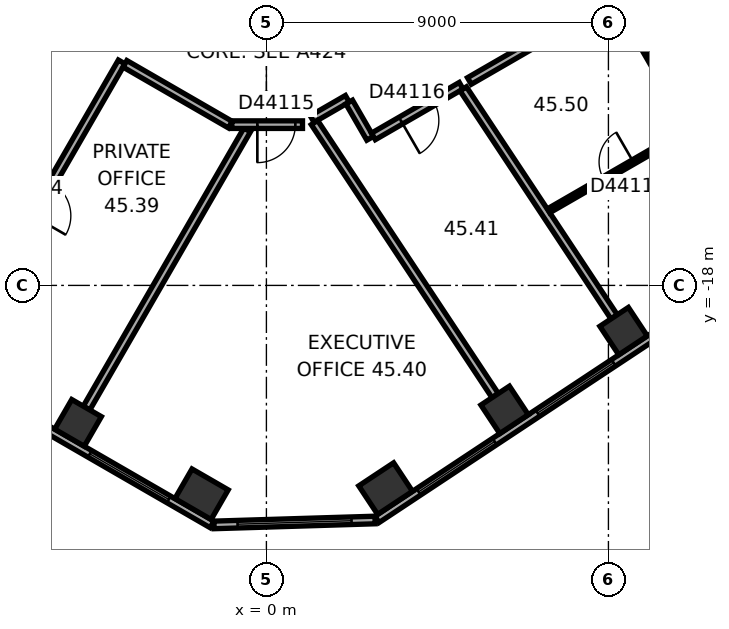
"""IFC4 building model, lengths in metres.
Left out: names, types, materials, properties, quantities, classifications, styles, units other than length and angle.
Written with IfcOpenShell. Run it as: python <this file> out.ifc"""

import sys

from ifc_helpers import new_model, si_unit, direction, frame, frame_2d, origin, origin_2d, place, context, subcontext, project, spatial, rectangle, extrude, element, fill, save


model = new_model("IFC4")
c1 = context("Model", 3, precision=1e-05, world=origin(), true_north=direction((0.0, 1.0)))
c2 = subcontext(c1, "Body", "Model", "MODEL_VIEW")
j1 = project(units=[si_unit("LENGTHUNIT", "METRE"), si_unit("PLANEANGLEUNIT", "RADIAN")], contexts=[c1])
p1 = place(None, origin())
s1 = spatial("IfcSite", under=j1, at=p1, CompositionType="ELEMENT")
p2 = place(p1, origin())
s2 = spatial("IfcBuilding", under=s1, at=p2, CompositionType="ELEMENT")
p3 = place(p2, frame((0.0, 0.0, 183.6)))
s3 = spatial("IfcBuildingStorey", under=s2, at=p3, CompositionType="ELEMENT", Elevation=183.6)
p4 = place(p3, frame((-4.958, -21.617, 0.0), z_axis=(0.0, 0.0, 1.0), x_axis=(0.866025403784, -0.5, 0.0)))
e1 = element("IfcColumn", 1, at=p4, inside=s3, PredefinedType="COLUMN", context=c2, shape_type="SweptSolid", body=[
    extrude(rectangle(XDim=0.9, YDim=0.9, at=origin_2d()), origin(), (0.0, 0.0, 1.0), 3.7),
])
for number, where, z_axis, x_axis in (
    (2, (-1.706, -23.494, 0.0), (0.0, 0.0, 1.0), (0.866, -0.5, 0.0)),
    (3, (3.137, -23.346, 0.0), (0.0, 0.0, 1.0), (0.834, 0.552, 0.0)),
):
    element("IfcColumn", number, at=place(p3, frame(where, z_axis=z_axis, x_axis=x_axis)), inside=s3, PredefinedType="COLUMN", context=c2, shape_type="SweptSolid", body=[
        extrude(rectangle(XDim=1.1, YDim=0.9, at=origin_2d()), origin(), (0.0, 0.0, 1.0), 3.7),
    ])
for number, where, z_axis, x_axis in (
    (4, (6.268, -21.274, 0.0), (0.0, 0.0, 1.0), (0.834, 0.552, 0.0)),
    (5, (9.398, -19.202, 0.0), (0.0, 0.0, 1.0), (0.834, 0.552, 0.0)),
):
    element("IfcColumn", number, at=place(p3, frame(where, z_axis=z_axis, x_axis=x_axis)), inside=s3, PredefinedType="COLUMN", context=c2, shape_type="SweptSolid", body=[
        extrude(rectangle(XDim=0.9, YDim=0.9, at=origin_2d()), origin(), (0.0, 0.0, 1.0), 3.7),
    ])
p5 = place(p3, frame((-10.25, -5.629, 0.0), z_axis=(0.0, 0.0, 1.0), x_axis=(0.866022616891, -0.50000482701, 0.0)))
e6 = element("IfcWall", 6, at=p5, inside=s3, PredefinedType="SHEAR", context=c2, shape_type="SweptSolid", body=[
    extrude(rectangle(XDim=12.125, YDim=1.0, at=frame_2d((6.062, 0.0))), origin(), (0.0, 0.0, 1.0), 3.7),
])
p6 = place(p5, frame((6.262, 0.0, 0.0)))
e7 = element("IfcOpeningElement", 7, at=p6, cuts=e6, PredefinedType="OPENING", context=c2, shape_type="SweptSolid", body=[
    extrude(rectangle(XDim=1.5, YDim=2.1, at=frame_2d((0.75, 1.05))), frame((0.0, 0.51, 0.0), z_axis=(0.0, -1.0, 0.0), x_axis=(1.0, 0.0, 0.0)), (0.0, 0.0, 1.0), 1.02),
])
p7 = place(p5, frame((1.712, 0.0, 0.0)))
e8 = element("IfcOpeningElement", 8, at=p7, cuts=e6, PredefinedType="OPENING", context=c2, shape_type="SweptSolid", body=[
    extrude(rectangle(XDim=1.1, YDim=2.1, at=frame_2d((0.55, 1.05))), frame((0.0, 0.51, 0.0), z_axis=(0.0, -1.0, 0.0), x_axis=(1.0, 0.0, 0.0)), (0.0, 0.0, 1.0), 1.02),
])
p8 = place(p5, frame((4.312, 0.0, 0.0)))
e9 = element("IfcOpeningElement", 9, at=p8, cuts=e6, PredefinedType="OPENING", context=c2, shape_type="SweptSolid", body=[
    extrude(rectangle(XDim=1.1, YDim=2.1, at=frame_2d((0.55, 1.05))), frame((0.0, 0.51, 0.0), z_axis=(0.0, -1.0, 0.0), x_axis=(1.0, 0.0, 0.0)), (0.0, 0.0, 1.0), 1.02),
])
p9 = place(p3, frame((-0.25, -11.691, 0.0), z_axis=(0.0, 0.0, 1.0), x_axis=(0.866022616891, 0.50000482701, 0.0)))
e10 = element("IfcWall", 10, at=p9, inside=s3, PredefinedType="SHEAR", context=c2, shape_type="SweptSolid", body=[
    extrude(rectangle(XDim=12.125, YDim=1.0, at=frame_2d((6.062, 0.0))), origin(), (0.0, 0.0, 1.0), 3.7),
])
p10 = place(p9, frame((2.612, 0.0, 0.0)))
e11 = element("IfcOpeningElement", 11, at=p10, cuts=e10, PredefinedType="OPENING", context=c2, shape_type="SweptSolid", body=[
    extrude(rectangle(XDim=1.1, YDim=2.1, at=frame_2d((0.55, 1.05))), frame((0.0, 0.51, 0.0), z_axis=(0.0, -1.0, 0.0), x_axis=(1.0, 0.0, 0.0)), (0.0, 0.0, 1.0), 1.02),
])
p11 = place(p9, frame((5.212, 0.0, 0.0)))
e12 = element("IfcOpeningElement", 12, at=p11, cuts=e10, PredefinedType="OPENING", context=c2, shape_type="SweptSolid", body=[
    extrude(rectangle(XDim=1.1, YDim=2.1, at=frame_2d((0.55, 1.05))), frame((0.0, 0.51, 0.0), z_axis=(0.0, -1.0, 0.0), x_axis=(1.0, 0.0, 0.0)), (0.0, 0.0, 1.0), 1.02),
])
p12 = place(p9, frame((7.812, 0.0, 0.0)))
e13 = element("IfcOpeningElement", 13, at=p12, cuts=e10, PredefinedType="OPENING", context=c2, shape_type="SweptSolid", body=[
    extrude(rectangle(XDim=1.1, YDim=2.1, at=frame_2d((0.55, 1.05))), frame((0.0, 0.51, 0.0), z_axis=(0.0, -1.0, 0.0), x_axis=(1.0, 0.0, 0.0)), (0.0, 0.0, 1.0), 1.02),
])
p13 = place(p3, frame((-18.789, -14.267, 0.0), z_axis=(0.0, 0.0, 1.0), x_axis=(0.866023315909, -0.500003616288, 0.0)))
e14 = element("IfcWall", 14, at=p13, inside=s3, PredefinedType="STANDARD", context=c2, shape_type="SweptSolid", body=[
    extrude(rectangle(XDim=20.044, YDim=0.2, at=frame_2d((10.022, 0.0))), origin(), (0.0, 0.0, 1.0), 3.7),
])
p14 = place(p13, frame((1.314, 0.0, 0.9)))
e15 = element("IfcOpeningElement", 15, at=p14, cuts=e14, PredefinedType="OPENING", context=c2, shape_type="SweptSolid", body=[
    extrude(rectangle(XDim=2.4, YDim=2.0, at=frame_2d((1.2, 1.0))), frame((0.0, 0.11, 0.0), z_axis=(0.0, -1.0, 0.0), x_axis=(1.0, 0.0, 0.0)), (0.0, 0.0, 1.0), 0.22),
])
p15 = place(p13, frame((5.069, 0.0, 0.9)))
e16 = element("IfcOpeningElement", 16, at=p15, cuts=e14, PredefinedType="OPENING", context=c2, shape_type="SweptSolid", body=[
    extrude(rectangle(XDim=2.4, YDim=2.0, at=frame_2d((1.2, 1.0))), frame((0.0, 0.11, 0.0), z_axis=(0.0, -1.0, 0.0), x_axis=(1.0, 0.0, 0.0)), (0.0, 0.0, 1.0), 0.22),
])
p16 = place(p13, frame((8.823, 0.0, 0.9)))
e17 = element("IfcOpeningElement", 17, at=p16, cuts=e14, PredefinedType="OPENING", context=c2, shape_type="SweptSolid", body=[
    extrude(rectangle(XDim=2.4, YDim=2.0, at=frame_2d((1.2, 1.0))), frame((0.0, 0.11, 0.0), z_axis=(0.0, -1.0, 0.0), x_axis=(1.0, 0.0, 0.0)), (0.0, 0.0, 1.0), 0.22),
])
p17 = place(p13, frame((12.577, 0.0, 0.9)))
e18 = element("IfcOpeningElement", 18, at=p17, cuts=e14, PredefinedType="OPENING", context=c2, shape_type="SweptSolid", body=[
    extrude(rectangle(XDim=2.4, YDim=2.0, at=frame_2d((1.2, 1.0))), frame((0.0, 0.11, 0.0), z_axis=(0.0, -1.0, 0.0), x_axis=(1.0, 0.0, 0.0)), (0.0, 0.0, 1.0), 0.22),
])
p18 = place(p13, frame((16.331, 0.0, 0.9)))
e19 = element("IfcOpeningElement", 19, at=p18, cuts=e14, PredefinedType="OPENING", context=c2, shape_type="SweptSolid", body=[
    extrude(rectangle(XDim=2.4, YDim=2.0, at=frame_2d((1.2, 1.0))), frame((0.0, 0.11, 0.0), z_axis=(0.0, -1.0, 0.0), x_axis=(1.0, 0.0, 0.0)), (0.0, 0.0, 1.0), 0.22),
])
p19 = place(p3, frame((-1.378, -24.302, 0.0), z_axis=(0.0, 0.0, 1.0), x_axis=(0.999533857267, 0.030529791629, 0.0)))
e20 = element("IfcWall", 20, at=p19, inside=s3, PredefinedType="STANDARD", context=c2, shape_type="SweptSolid", body=[
    extrude(rectangle(XDim=4.238, YDim=0.2, at=frame_2d((2.119, 0.0))), origin(), (0.0, 0.0, 1.0), 3.7),
])
p20 = place(p19, frame((0.619, 0.0, 0.9)))
e21 = element("IfcOpeningElement", 21, at=p20, cuts=e20, PredefinedType="OPENING", context=c2, shape_type="SweptSolid", body=[
    extrude(rectangle(XDim=3.0, YDim=2.0, at=frame_2d((1.5, 1.0))), frame((0.0, 0.11, 0.0), z_axis=(0.0, -1.0, 0.0), x_axis=(1.0, 0.0, 0.0)), (0.0, 0.0, 1.0), 0.22),
])
p21 = place(p3, frame((2.911, -24.156, 0.0), z_axis=(0.0, 0.0, 1.0), x_axis=(0.833882163564, 0.551942512668, 0.0)))
e22 = element("IfcWall", 22, at=p21, inside=s3, PredefinedType="STANDARD", context=c2, shape_type="SweptSolid", body=[
    extrude(rectangle(XDim=20.044, YDim=0.2, at=frame_2d((10.022, 0.0))), origin(), (0.0, 0.0, 1.0), 3.7),
])
p22 = place(p21, frame((1.313, 0.0, 0.9)))
e23 = element("IfcOpeningElement", 23, at=p22, cuts=e22, PredefinedType="OPENING", context=c2, shape_type="SweptSolid", body=[
    extrude(rectangle(XDim=2.4, YDim=2.0, at=frame_2d((1.2, 1.0))), frame((0.0, 0.11, 0.0), z_axis=(0.0, -1.0, 0.0), x_axis=(1.0, 0.0, 0.0)), (0.0, 0.0, 1.0), 0.22),
])
p23 = place(p21, frame((5.067, 0.0, 0.9)))
e24 = element("IfcOpeningElement", 24, at=p23, cuts=e22, PredefinedType="OPENING", context=c2, shape_type="SweptSolid", body=[
    extrude(rectangle(XDim=2.4, YDim=2.0, at=frame_2d((1.2, 1.0))), frame((0.0, 0.11, 0.0), z_axis=(0.0, -1.0, 0.0), x_axis=(1.0, 0.0, 0.0)), (0.0, 0.0, 1.0), 0.22),
])
p24 = place(p21, frame((8.821, 0.0, 0.9)))
e25 = element("IfcOpeningElement", 25, at=p24, cuts=e22, PredefinedType="OPENING", context=c2, shape_type="SweptSolid", body=[
    extrude(rectangle(XDim=2.4, YDim=2.0, at=frame_2d((1.2, 1.0))), frame((0.0, 0.11, 0.0), z_axis=(0.0, -1.0, 0.0), x_axis=(1.0, 0.0, 0.0)), (0.0, 0.0, 1.0), 0.22),
])
p25 = place(p21, frame((12.575, 0.0, 0.9)))
e26 = element("IfcOpeningElement", 26, at=p25, cuts=e22, PredefinedType="OPENING", context=c2, shape_type="SweptSolid", body=[
    extrude(rectangle(XDim=2.4, YDim=2.0, at=frame_2d((1.2, 1.0))), frame((0.0, 0.11, 0.0), z_axis=(0.0, -1.0, 0.0), x_axis=(1.0, 0.0, 0.0)), (0.0, 0.0, 1.0), 0.22),
])
p26 = place(p21, frame((16.329, 0.0, 0.9)))
e27 = element("IfcOpeningElement", 27, at=p26, cuts=e22, PredefinedType="OPENING", context=c2, shape_type="SweptSolid", body=[
    extrude(rectangle(XDim=2.4, YDim=2.0, at=frame_2d((1.2, 1.0))), frame((0.0, 0.11, 0.0), z_axis=(0.0, -1.0, 0.0), x_axis=(1.0, 0.0, 0.0)), (0.0, 0.0, 1.0), 0.22),
])
p27 = place(p3, frame((-7.984, -19.351, 0.0), z_axis=(0.0, 0.0, 1.0), x_axis=(0.500010139422, 0.866019549707, 0.0)))
e28 = element("IfcWall", 28, at=p27, inside=s3, PredefinedType="PARTITIONING", context=c2, shape_type="SweptSolid", body=[
    extrude(rectangle(XDim=8.35, YDim=0.2, at=frame_2d((4.175, 0.0))), origin(), (0.0, 0.0, 1.0), 3.42),
])
p28 = place(p27, frame((3.675, 0.0, 0.0)))
e29 = element("IfcOpeningElement", 29, at=p28, cuts=e28, PredefinedType="OPENING", context=c2, shape_type="SweptSolid", body=[
    extrude(rectangle(XDim=1.0, YDim=2.1, at=frame_2d((0.5, 1.05))), frame((0.0, 0.11, 0.0), z_axis=(0.0, -1.0, 0.0), x_axis=(1.0, 0.0, 0.0)), (0.0, 0.0, 1.0), 0.22),
])
p29 = place(p3, frame((-4.732, -21.228, 0.0), z_axis=(0.0, 0.0, 1.0), x_axis=(0.500000843414, 0.866024916838, 0.0)))
e30 = element("IfcWall", 30, at=p29, inside=s3, PredefinedType="PARTITIONING", context=c2, shape_type="SweptSolid", body=[
    extrude(rectangle(XDim=8.452, YDim=0.2, at=frame_2d((4.226, 0.0))), origin(), (0.0, 0.0, 1.0), 3.42),
])
p30 = place(p3, frame((-3.722, -12.169, 0.0), z_axis=(0.0, 0.0, 1.0), x_axis=(0.866033163891, -0.499986558861, 0.0)))
e31 = element("IfcWall", 31, at=p30, inside=s3, PredefinedType="PARTITIONING", context=c2, shape_type="SweptSolid", body=[
    extrude(rectangle(XDim=3.201, YDim=0.2, at=frame_2d((1.6, 0.0))), origin(), (0.0, 0.0, 1.0), 3.42),
])
p31 = place(p3, frame((-0.91, -13.77, 0.0), z_axis=(0.0, 0.0, 1.0), x_axis=(1.0, 0.0, 0.0)))
e32 = element("IfcWall", 32, at=p31, inside=s3, PredefinedType="PARTITIONING", context=c2, shape_type="SweptSolid", body=[
    extrude(rectangle(XDim=1.86, YDim=0.2, at=frame_2d((0.93, 0.0))), origin(), (0.0, 0.0, 1.0), 3.42),
])
p32 = place(p31, frame((0.672, 0.0, 0.0)))
e33 = element("IfcOpeningElement", 33, at=p32, cuts=e32, PredefinedType="OPENING", context=c2, shape_type="SweptSolid", body=[
    extrude(rectangle(XDim=1.0, YDim=2.1, at=frame_2d((0.5, 1.05))), frame((0.0, 0.11, 0.0), z_axis=(0.0, -1.0, 0.0), x_axis=(1.0, 0.0, 0.0)), (0.0, 0.0, 1.0), 0.22),
])
p33 = place(p3, frame((1.204, -13.623, 0.0), z_axis=(0.0, 0.0, 1.0), x_axis=(0.866040989419, 0.499973003918, 0.0)))
e34 = element("IfcWall", 34, at=p33, inside=s3, PredefinedType="PARTITIONING", context=c2, shape_type="SweptSolid", body=[
    extrude(rectangle(XDim=1.068, YDim=0.2, at=frame_2d((0.534, 0.0))), origin(), (0.0, 0.0, 1.0), 3.42),
])
p34 = place(p3, frame((2.179, -13.176, 0.0), z_axis=(0.0, 0.0, 1.0), x_axis=(0.499978356969, -0.866037899034, 0.0)))
e35 = element("IfcWall", 35, at=p34, inside=s3, PredefinedType="PARTITIONING", context=c2, shape_type="SweptSolid", body=[
    extrude(rectangle(XDim=1.101, YDim=0.2, at=frame_2d((0.551, 0.0))), origin(), (0.0, 0.0, 1.0), 3.42),
])
p35 = place(p3, frame((2.816, -14.079, 0.0), z_axis=(0.0, 0.0, 1.0), x_axis=(0.866008705299, 0.50002892151, 0.0)))
e36 = element("IfcWall", 36, at=p35, inside=s3, PredefinedType="PARTITIONING", context=c2, shape_type="SweptSolid", body=[
    extrude(rectangle(XDim=2.666, YDim=0.2, at=frame_2d((1.333, 0.0))), origin(), (0.0, 0.0, 1.0), 3.42),
])
p36 = place(p35, frame((0.833, 0.0, 0.0)))
e37 = element("IfcOpeningElement", 37, at=p36, cuts=e36, PredefinedType="OPENING", context=c2, shape_type="SweptSolid", body=[
    extrude(rectangle(XDim=1.0, YDim=2.1, at=frame_2d((0.5, 1.05))), frame((0.0, 0.11, 0.0), z_axis=(0.0, -1.0, 0.0), x_axis=(1.0, 0.0, 0.0)), (0.0, 0.0, 1.0), 0.22),
])
p37 = place(p3, frame((5.342, -12.621, 0.0), z_axis=(0.0, 0.0, 1.0), x_axis=(0.866024665123, 0.500001279396, 0.0)))
e38 = element("IfcWall", 38, at=p37, inside=s3, PredefinedType="PARTITIONING", context=c2, shape_type="SweptSolid", body=[
    extrude(rectangle(XDim=5.786, YDim=0.2, at=frame_2d((2.893, 0.0))), origin(), (0.0, 0.0, 1.0), 3.42),
])
p38 = place(p3, frame((6.02, -20.899, 0.0), z_axis=(0.0, 0.0, 1.0), x_axis=(-0.551943990108, 0.833881185651, 0.0)))
e39 = element("IfcWall", 39, at=p38, inside=s3, PredefinedType="PARTITIONING", context=c2, shape_type="SweptSolid", body=[
    extrude(rectangle(XDim=8.615, YDim=0.2, at=frame_2d((4.308, 0.0))), origin(), (0.0, 0.0, 1.0), 3.42),
])
p39 = place(p3, frame((9.15, -18.827, 0.0), z_axis=(0.0, 0.0, 1.0), x_axis=(-0.551939801345, 0.833883958169, 0.0)))
e40 = element("IfcWall", 40, at=p39, inside=s3, PredefinedType="PARTITIONING", context=c2, shape_type="SweptSolid", body=[
    extrude(rectangle(XDim=7.192, YDim=0.2, at=frame_2d((3.596, 0.0))), origin(), (0.0, 0.0, 1.0), 2.87),
])
p40 = place(p3, frame((9.202, -10.508, 0.0), z_axis=(0.0, 0.0, 1.0), x_axis=(0.500043961785, -0.866000020948, 0.0)))
e41 = element("IfcWall", 41, at=p40, inside=s3, PredefinedType="PARTITIONING", context=c2, shape_type="SweptSolid", body=[
    extrude(rectangle(XDim=3.9, YDim=0.12, at=frame_2d((1.95, 0.0))), origin(), (0.0, 0.0, 1.0), 3.42),
])
p41 = place(p3, frame((11.1, -13.915, 0.0), z_axis=(0.0, 0.0, 1.0), x_axis=(-0.866048475386, -0.499960036685, 0.0)))
e42 = element("IfcWall", 42, at=p41, inside=s3, PredefinedType="PARTITIONING", context=c2, shape_type="SweptSolid", body=[
    extrude(rectangle(XDim=4.24, YDim=0.12, at=frame_2d((2.12, 0.0))), origin(), (0.0, 0.0, 1.0), 3.42),
])
p42 = place(p41, frame((1.67, 0.0, 0.0)))
e43 = element("IfcOpeningElement", 43, at=p42, cuts=e42, PredefinedType="OPENING", context=c2, shape_type="SweptSolid", body=[
    extrude(rectangle(XDim=0.9, YDim=2.1, at=frame_2d((0.45, 1.05))), frame((0.0, 0.07, 0.0), z_axis=(0.0, -1.0, 0.0), x_axis=(1.0, 0.0, 0.0)), (0.0, 0.0, 1.0), 0.14),
])
p43 = place(p18, origin())
e44 = element("IfcWindow", 44, at=p43, inside=s3, PartitioningType="SINGLE_PANEL", PredefinedType="WINDOW", context=c2, shape_type="SweptSolid", body=[
    extrude(rectangle(XDim=2.4, YDim=2.0, at=frame_2d((1.2, 1.0))), frame((0.0, 0.03, 0.0), z_axis=(0.0, -1.0, 0.0), x_axis=(1.0, 0.0, 0.0)), (0.0, 0.0, 1.0), 0.06),
])
fill(e19, e44)
p44 = place(p20, origin())
e45 = element("IfcWindow", 45, at=p44, inside=s3, PartitioningType="SINGLE_PANEL", PredefinedType="WINDOW", context=c2, shape_type="SweptSolid", body=[
    extrude(rectangle(XDim=3.0, YDim=2.0, at=frame_2d((1.5, 1.0))), frame((0.0, 0.03, 0.0), z_axis=(0.0, -1.0, 0.0), x_axis=(1.0, 0.0, 0.0)), (0.0, 0.0, 1.0), 0.06),
])
fill(e21, e45)
p45 = place(p22, origin())
e46 = element("IfcWindow", 46, at=p45, inside=s3, PartitioningType="SINGLE_PANEL", PredefinedType="WINDOW", context=c2, shape_type="SweptSolid", body=[
    extrude(rectangle(XDim=2.4, YDim=2.0, at=frame_2d((1.2, 1.0))), frame((0.0, 0.03, 0.0), z_axis=(0.0, -1.0, 0.0), x_axis=(1.0, 0.0, 0.0)), (0.0, 0.0, 1.0), 0.06),
])
fill(e23, e46)
p46 = place(p23, origin())
e47 = element("IfcWindow", 47, at=p46, inside=s3, PartitioningType="SINGLE_PANEL", PredefinedType="WINDOW", context=c2, shape_type="SweptSolid", body=[
    extrude(rectangle(XDim=2.4, YDim=2.0, at=frame_2d((1.2, 1.0))), frame((0.0, 0.03, 0.0), z_axis=(0.0, -1.0, 0.0), x_axis=(1.0, 0.0, 0.0)), (0.0, 0.0, 1.0), 0.06),
])
fill(e24, e47)
p47 = place(p28, origin())
e48 = element("IfcDoor", 48, at=p47, inside=s3, OperationType="SINGLE_SWING_LEFT", PredefinedType="DOOR", context=c2, shape_type="SweptSolid", body=[
    extrude(rectangle(XDim=1.0, YDim=2.1, at=frame_2d((0.5, 1.05))), frame((0.0, 0.025, 0.0), z_axis=(0.0, -1.0, 0.0), x_axis=(1.0, 0.0, 0.0)), (0.0, 0.0, 1.0), 0.05),
])
fill(e29, e48)
p48 = place(p32, origin())
e49 = element("IfcDoor", 49, at=p48, inside=s3, OperationType="SINGLE_SWING_LEFT", PredefinedType="DOOR", context=c2, shape_type="SweptSolid", body=[
    extrude(rectangle(XDim=1.0, YDim=2.1, at=frame_2d((0.5, 1.05))), frame((0.0, 0.025, 0.0), z_axis=(0.0, -1.0, 0.0), x_axis=(1.0, 0.0, 0.0)), (0.0, 0.0, 1.0), 0.05),
])
fill(e33, e49)
p49 = place(p36, origin())
e50 = element("IfcDoor", 50, at=p49, inside=s3, OperationType="SINGLE_SWING_LEFT", PredefinedType="DOOR", context=c2, shape_type="SweptSolid", body=[
    extrude(rectangle(XDim=1.0, YDim=2.1, at=frame_2d((0.5, 1.05))), frame((0.0, 0.025, 0.0), z_axis=(0.0, -1.0, 0.0), x_axis=(1.0, 0.0, 0.0)), (0.0, 0.0, 1.0), 0.05),
])
fill(e37, e50)
p50 = place(p42, origin())
e51 = element("IfcDoor", 51, at=p50, inside=s3, OperationType="SINGLE_SWING_LEFT", PredefinedType="DOOR", context=c2, shape_type="SweptSolid", body=[
    extrude(rectangle(XDim=0.9, YDim=2.1, at=frame_2d((0.45, 1.05))), frame((0.0, 0.025, 0.0), z_axis=(0.0, -1.0, 0.0), x_axis=(1.0, 0.0, 0.0)), (0.0, 0.0, 1.0), 0.05),
])
fill(e43, e51)
save(model, sys.argv[1])
